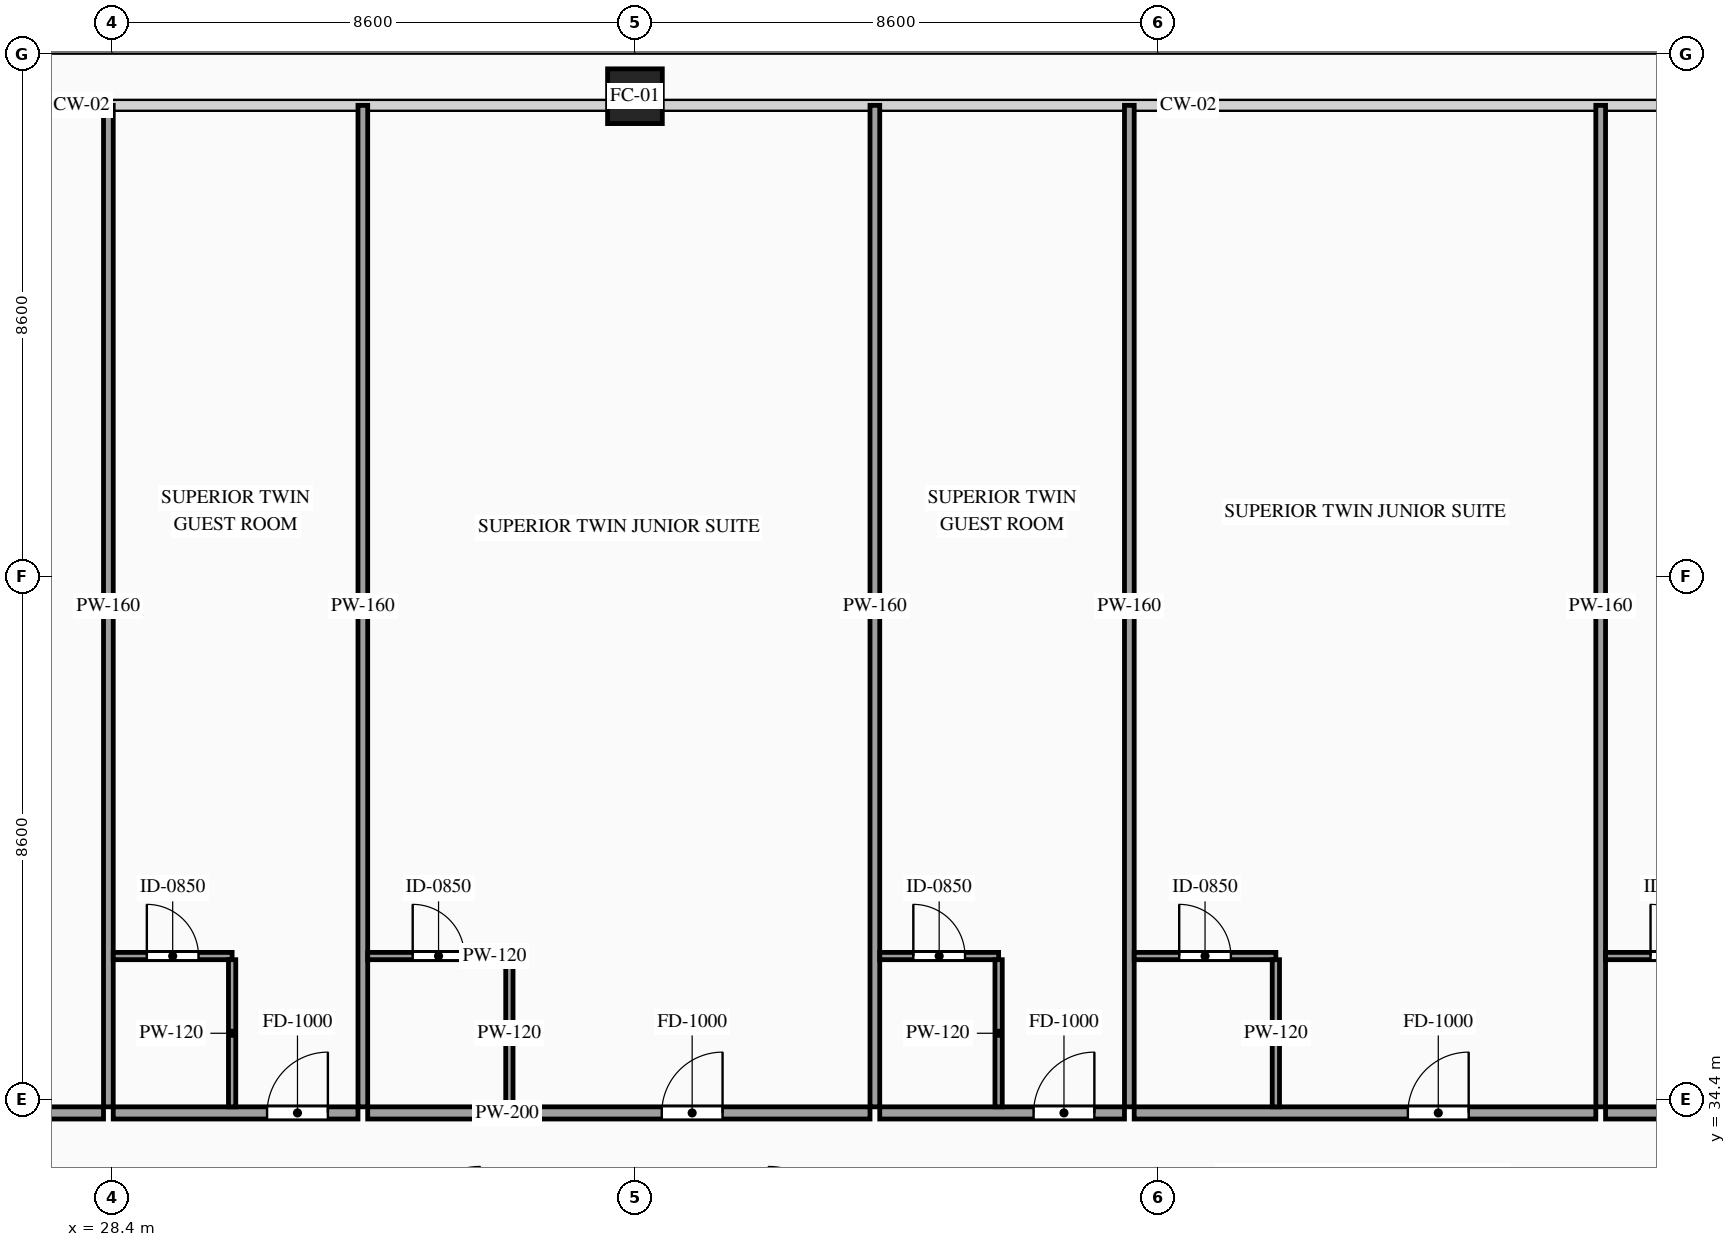
"""IFC4 building model, lengths in metres.
Left out: names, types, materials, properties, quantities, classifications, styles, units other than length and angle.
Written with IfcOpenShell. Run it as: python <this file> out.ifc"""

import sys

from ifc_helpers import new_model, si_unit, direction, frame, frame_2d, origin, origin_2d, place, context, subcontext, project, spatial, rectangle, hollow_rectangle, extrude, source, transform, mapped, element, fill, save


model = new_model("IFC4")
c1 = context("Model", 3, precision=1e-05, world=origin(), true_north=direction((0.0, 1.0)))
c2 = subcontext(c1, "Body", "Model", "MODEL_VIEW")
j1 = project(units=[si_unit("LENGTHUNIT", "METRE"), si_unit("PLANEANGLEUNIT", "RADIAN")], contexts=[c1])
p1 = place(None, origin())
s1 = spatial("IfcSite", under=j1, at=p1, CompositionType="ELEMENT")
p2 = place(p1, origin())
s2 = spatial("IfcBuilding", under=s1, at=p2, CompositionType="ELEMENT")
p3 = place(p2, frame((0.0, 0.0, 53.2)))
s3 = spatial("IfcBuildingStorey", under=s2, at=p3, CompositionType="ELEMENT", Elevation=53.2)
m1 = source(origin(), c2, "Body", "SweptSolid", [
    extrude(hollow_rectangle(XDim=0.9, YDim=0.9, WallThickness=0.042, at=origin_2d()), origin(), (0.0, 0.0, 1.0), 3.6),
])
p4 = place(p3, frame((37.0, 50.9, 0.0), z_axis=(0.0, 0.0, 1.0), x_axis=(1.0, 0.0, 0.0)))
e1 = element("IfcColumn", 1, at=p4, inside=s3, PredefinedType="COLUMN", context=c2, shape_type="MappedRepresentation", body=[
    mapped(m1, transform((0.0, 0.0, 0.0), scale=1.0)),
])
p5 = place(p3, frame((21.197, 34.18, 0.0), z_axis=(0.0, 0.0, 1.0), x_axis=(1.0, 0.0, 0.0)))
e2 = element("IfcWall", 2, at=p5, inside=s3, PredefinedType="PARTITIONING", context=c2, shape_type="SweptSolid", body=[
    extrude(rectangle(XDim=7.063, YDim=0.2, at=frame_2d((3.531, 0.0))), origin(), (0.0, 0.0, 1.0), 3.38),
])
p6 = place(p5, frame((4.237, 0.0, 0.0)))
e3 = element("IfcOpeningElement", 3, at=p6, cuts=e2, PredefinedType="OPENING", context=c2, shape_type="SweptSolid", body=[
    extrude(rectangle(XDim=1.0, YDim=2.2, at=frame_2d((0.5, 1.1))), frame((0.0, 0.115, 0.0), z_axis=(0.0, -1.0, 0.0), x_axis=(1.0, 0.0, 0.0)), (0.0, 0.0, 1.0), 0.23),
])
m2 = source(origin(), c2, "Body", "SweptSolid", [
    extrude(rectangle(XDim=16.47, YDim=0.16, at=frame_2d((8.235, 0.0))), origin(), (0.0, 0.0, 1.0), 3.38),
])
p7 = place(p3, frame((28.34, 34.28, 0.0), z_axis=(0.0, 0.0, 1.0), x_axis=(0.0, 1.0, 0.0)))
e4 = element("IfcWall", 4, at=p7, inside=s3, PredefinedType="PARTITIONING", context=c2, shape_type="MappedRepresentation", body=[
    mapped(m2, transform((0.0, 0.0, 0.0), scale=1.0)),
])
p8 = place(p3, frame((28.42, 34.18, 0.0), z_axis=(0.0, 0.0, 1.0), x_axis=(1.0, 0.0, 0.0)))
e5 = element("IfcWall", 5, at=p8, inside=s3, PredefinedType="PARTITIONING", context=c2, shape_type="SweptSolid", body=[
    extrude(rectangle(XDim=4.025, YDim=0.2, at=frame_2d((2.013, 0.0))), origin(), (0.0, 0.0, 1.0), 3.38),
])
p9 = place(p8, frame((2.53, 0.0, 0.0)))
e6 = element("IfcOpeningElement", 6, at=p9, cuts=e5, PredefinedType="OPENING", context=c2, shape_type="SweptSolid", body=[
    extrude(rectangle(XDim=1.0, YDim=2.2, at=frame_2d((0.5, 1.1))), frame((0.0, 0.115, 0.0), z_axis=(0.0, -1.0, 0.0), x_axis=(1.0, 0.0, 0.0)), (0.0, 0.0, 1.0), 0.23),
])
p10 = place(p3, frame((32.525, 34.28, 0.0), z_axis=(0.0, 0.0, 1.0), x_axis=(0.0, 1.0, 0.0)))
e7 = element("IfcWall", 7, at=p10, inside=s3, PredefinedType="PARTITIONING", context=c2, shape_type="MappedRepresentation", body=[
    mapped(m2, transform((0.0, 0.0, 0.0), scale=1.0)),
])
p11 = place(p3, frame((28.42, 36.76, 0.0), z_axis=(0.0, 0.0, 1.0), x_axis=(1.0, 0.0, 0.0)))
e8 = element("IfcWall", 8, at=p11, inside=s3, PredefinedType="PARTITIONING", context=c2, shape_type="SweptSolid", body=[
    extrude(rectangle(XDim=1.955, YDim=0.12, at=frame_2d((0.978, 0.0))), origin(), (0.0, 0.0, 1.0), 3.38),
])
p12 = place(p11, frame((0.552, 0.0, 0.0)))
e9 = element("IfcOpeningElement", 9, at=p12, cuts=e8, PredefinedType="OPENING", context=c2, shape_type="SweptSolid", body=[
    extrude(rectangle(XDim=0.85, YDim=2.1, at=frame_2d((0.425, 1.05))), frame((0.0, 0.075, 0.0), z_axis=(0.0, -1.0, 0.0), x_axis=(1.0, 0.0, 0.0)), (0.0, 0.0, 1.0), 0.15),
])
m3 = source(origin(), c2, "Body", "SweptSolid", [
    extrude(rectangle(XDim=2.42, YDim=0.12, at=frame_2d((1.21, 0.0))), origin(), (0.0, 0.0, 1.0), 3.38),
])
p13 = place(p3, frame((30.375, 34.28, 0.0), z_axis=(0.0, 0.0, 1.0), x_axis=(0.0, 1.0, 0.0)))
e10 = element("IfcWall", 10, at=p13, inside=s3, PredefinedType="PARTITIONING", context=c2, shape_type="MappedRepresentation", body=[
    mapped(m3, transform((0.0, 0.0, 0.0), scale=1.0)),
])
p14 = place(p3, frame((32.605, 34.18, 0.0), z_axis=(0.0, 0.0, 1.0), x_axis=(1.0, 0.0, 0.0)))
e11 = element("IfcWall", 11, at=p14, inside=s3, PredefinedType="PARTITIONING", context=c2, shape_type="SweptSolid", body=[
    extrude(rectangle(XDim=8.261, YDim=0.2, at=frame_2d((4.13, 0.0))), origin(), (0.0, 0.0, 1.0), 3.38),
])
p15 = place(p14, frame((4.836, 0.0, 0.0)))
e12 = element("IfcOpeningElement", 12, at=p15, cuts=e11, PredefinedType="OPENING", context=c2, shape_type="SweptSolid", body=[
    extrude(rectangle(XDim=1.0, YDim=2.2, at=frame_2d((0.5, 1.1))), frame((0.0, 0.115, 0.0), z_axis=(0.0, -1.0, 0.0), x_axis=(1.0, 0.0, 0.0)), (0.0, 0.0, 1.0), 0.23),
])
p16 = place(p3, frame((40.946, 34.28, 0.0), z_axis=(0.0, 0.0, 1.0), x_axis=(0.0, 1.0, 0.0)))
e13 = element("IfcWall", 13, at=p16, inside=s3, PredefinedType="PARTITIONING", context=c2, shape_type="MappedRepresentation", body=[
    mapped(m2, transform((0.0, 0.0, 0.0), scale=1.0)),
])
p17 = place(p3, frame((32.605, 36.76, 0.0), z_axis=(0.0, 0.0, 1.0), x_axis=(1.0, 0.0, 0.0)))
e14 = element("IfcWall", 14, at=p17, inside=s3, PredefinedType="PARTITIONING", context=c2, shape_type="SweptSolid", body=[
    extrude(rectangle(XDim=2.33, YDim=0.12, at=frame_2d((1.165, 0.0))), origin(), (0.0, 0.0, 1.0), 3.38),
])
p18 = place(p17, frame((0.74, 0.0, 0.0)))
e15 = element("IfcOpeningElement", 15, at=p18, cuts=e14, PredefinedType="OPENING", context=c2, shape_type="SweptSolid", body=[
    extrude(rectangle(XDim=0.85, YDim=2.1, at=frame_2d((0.425, 1.05))), frame((0.0, 0.075, 0.0), z_axis=(0.0, -1.0, 0.0), x_axis=(1.0, 0.0, 0.0)), (0.0, 0.0, 1.0), 0.15),
])
p19 = place(p3, frame((34.935, 34.28, 0.0), z_axis=(0.0, 0.0, 1.0), x_axis=(0.0, 1.0, 0.0)))
e16 = element("IfcWall", 16, at=p19, inside=s3, PredefinedType="PARTITIONING", context=c2, shape_type="MappedRepresentation", body=[
    mapped(m3, transform((0.0, 0.0, 0.0), scale=1.0)),
])
p20 = place(p3, frame((41.026, 34.18, 0.0), z_axis=(0.0, 0.0, 1.0), x_axis=(1.0, 0.0, 0.0)))
e17 = element("IfcWall", 17, at=p20, inside=s3, PredefinedType="PARTITIONING", context=c2, shape_type="SweptSolid", body=[
    extrude(rectangle(XDim=4.025, YDim=0.2, at=frame_2d((2.013, 0.0))), origin(), (0.0, 0.0, 1.0), 3.38),
])
p21 = place(p20, frame((2.53, 0.0, 0.0)))
e18 = element("IfcOpeningElement", 18, at=p21, cuts=e17, PredefinedType="OPENING", context=c2, shape_type="SweptSolid", body=[
    extrude(rectangle(XDim=1.0, YDim=2.2, at=frame_2d((0.5, 1.1))), frame((0.0, 0.115, 0.0), z_axis=(0.0, -1.0, 0.0), x_axis=(1.0, 0.0, 0.0)), (0.0, 0.0, 1.0), 0.23),
])
p22 = place(p3, frame((45.131, 34.28, 0.0), z_axis=(0.0, 0.0, 1.0), x_axis=(0.0, 1.0, 0.0)))
e19 = element("IfcWall", 19, at=p22, inside=s3, PredefinedType="PARTITIONING", context=c2, shape_type="MappedRepresentation", body=[
    mapped(m2, transform((0.0, 0.0, 0.0), scale=1.0)),
])
p23 = place(p3, frame((41.026, 36.76, 0.0), z_axis=(0.0, 0.0, 1.0), x_axis=(1.0, 0.0, 0.0)))
e20 = element("IfcWall", 20, at=p23, inside=s3, PredefinedType="PARTITIONING", context=c2, shape_type="SweptSolid", body=[
    extrude(rectangle(XDim=1.955, YDim=0.12, at=frame_2d((0.978, 0.0))), origin(), (0.0, 0.0, 1.0), 3.38),
])
p24 = place(p23, frame((0.552, 0.0, 0.0)))
e21 = element("IfcOpeningElement", 21, at=p24, cuts=e20, PredefinedType="OPENING", context=c2, shape_type="SweptSolid", body=[
    extrude(rectangle(XDim=0.85, YDim=2.1, at=frame_2d((0.425, 1.05))), frame((0.0, 0.075, 0.0), z_axis=(0.0, -1.0, 0.0), x_axis=(1.0, 0.0, 0.0)), (0.0, 0.0, 1.0), 0.15),
])
p25 = place(p3, frame((42.981, 34.28, 0.0), z_axis=(0.0, 0.0, 1.0), x_axis=(0.0, 1.0, 0.0)))
e22 = element("IfcWall", 22, at=p25, inside=s3, PredefinedType="PARTITIONING", context=c2, shape_type="MappedRepresentation", body=[
    mapped(m3, transform((0.0, 0.0, 0.0), scale=1.0)),
])
p26 = place(p3, frame((45.211, 34.18, 0.0), z_axis=(0.0, 0.0, 1.0), x_axis=(1.0, 0.0, 0.0)))
e23 = element("IfcWall", 23, at=p26, inside=s3, PredefinedType="PARTITIONING", context=c2, shape_type="SweptSolid", body=[
    extrude(rectangle(XDim=7.592, YDim=0.2, at=frame_2d((3.796, 0.0))), origin(), (0.0, 0.0, 1.0), 3.38),
])
p27 = place(p26, frame((4.501, 0.0, 0.0)))
e24 = element("IfcOpeningElement", 24, at=p27, cuts=e23, PredefinedType="OPENING", context=c2, shape_type="SweptSolid", body=[
    extrude(rectangle(XDim=1.0, YDim=2.2, at=frame_2d((0.5, 1.1))), frame((0.0, 0.115, 0.0), z_axis=(0.0, -1.0, 0.0), x_axis=(1.0, 0.0, 0.0)), (0.0, 0.0, 1.0), 0.23),
])
p28 = place(p3, frame((52.883, 34.28, 0.0), z_axis=(0.0, 0.0, 1.0), x_axis=(0.0, 1.0, 0.0)))
e25 = element("IfcWall", 25, at=p28, inside=s3, PredefinedType="PARTITIONING", context=c2, shape_type="MappedRepresentation", body=[
    mapped(m2, transform((0.0, 0.0, 0.0), scale=1.0)),
])
p29 = place(p3, frame((45.211, 36.76, 0.0), z_axis=(0.0, 0.0, 1.0), x_axis=(1.0, 0.0, 0.0)))
e26 = element("IfcWall", 26, at=p29, inside=s3, PredefinedType="PARTITIONING", context=c2, shape_type="SweptSolid", body=[
    extrude(rectangle(XDim=2.33, YDim=0.12, at=frame_2d((1.165, 0.0))), origin(), (0.0, 0.0, 1.0), 3.38),
])
p30 = place(p29, frame((0.74, 0.0, 0.0)))
e27 = element("IfcOpeningElement", 27, at=p30, cuts=e26, PredefinedType="OPENING", context=c2, shape_type="SweptSolid", body=[
    extrude(rectangle(XDim=0.85, YDim=2.1, at=frame_2d((0.425, 1.05))), frame((0.0, 0.075, 0.0), z_axis=(0.0, -1.0, 0.0), x_axis=(1.0, 0.0, 0.0)), (0.0, 0.0, 1.0), 0.15),
])
p31 = place(p3, frame((47.541, 34.28, 0.0), z_axis=(0.0, 0.0, 1.0), x_axis=(0.0, 1.0, 0.0)))
e28 = element("IfcWall", 28, at=p31, inside=s3, PredefinedType="PARTITIONING", context=c2, shape_type="MappedRepresentation", body=[
    mapped(m3, transform((0.0, 0.0, 0.0), scale=1.0)),
])
p32 = place(p3, frame((52.963, 34.18, 0.0), z_axis=(0.0, 0.0, 1.0), x_axis=(1.0, 0.0, 0.0)))
e29 = element("IfcWall", 29, at=p32, inside=s3, PredefinedType="PARTITIONING", context=c2, shape_type="SweptSolid", body=[
    extrude(rectangle(XDim=6.097, YDim=0.2, at=frame_2d((3.049, 0.0))), origin(), (0.0, 0.0, 1.0), 3.38),
])
p33 = place(p32, frame((3.753, 0.0, 0.0)))
e30 = element("IfcOpeningElement", 30, at=p33, cuts=e29, PredefinedType="OPENING", context=c2, shape_type="SweptSolid", body=[
    extrude(rectangle(XDim=1.0, YDim=2.2, at=frame_2d((0.5, 1.1))), frame((0.0, 0.115, 0.0), z_axis=(0.0, -1.0, 0.0), x_axis=(1.0, 0.0, 0.0)), (0.0, 0.0, 1.0), 0.23),
])
p34 = place(p3, frame((52.963, 36.76, 0.0), z_axis=(0.0, 0.0, 1.0), x_axis=(1.0, 0.0, 0.0)))
e31 = element("IfcWall", 31, at=p34, inside=s3, PredefinedType="PARTITIONING", context=c2, shape_type="SweptSolid", body=[
    extrude(rectangle(XDim=2.33, YDim=0.12, at=frame_2d((1.165, 0.0))), origin(), (0.0, 0.0, 1.0), 3.38),
])
p35 = place(p34, frame((0.74, 0.0, 0.0)))
e32 = element("IfcOpeningElement", 32, at=p35, cuts=e31, PredefinedType="OPENING", context=c2, shape_type="SweptSolid", body=[
    extrude(rectangle(XDim=0.85, YDim=2.1, at=frame_2d((0.425, 1.05))), frame((0.0, 0.075, 0.0), z_axis=(0.0, -1.0, 0.0), x_axis=(1.0, 0.0, 0.0)), (0.0, 0.0, 1.0), 0.15),
])
m4 = source(origin(), c2, "Body", "SweptSolid", [
    extrude(rectangle(XDim=1.0, YDim=2.2, at=frame_2d((0.5, 1.1))), frame((0.0, 0.025, 0.0), z_axis=(0.0, -1.0, 0.0), x_axis=(1.0, 0.0, 0.0)), (0.0, 0.0, 1.0), 0.05),
])
p36 = place(p9, origin())
e33 = element("IfcDoor", 33, at=p36, inside=s3, OperationType="SINGLE_SWING_RIGHT", PredefinedType="DOOR", context=c2, shape_type="MappedRepresentation", body=[
    mapped(m4, transform((0.0, 0.0, 0.0), scale=1.0)),
])
fill(e6, e33)
m5 = source(origin(), c2, "Body", "SweptSolid", [
    extrude(rectangle(XDim=0.85, YDim=2.1, at=frame_2d((0.425, 1.05))), frame((0.0, 0.025, 0.0), z_axis=(0.0, -1.0, 0.0), x_axis=(1.0, 0.0, 0.0)), (0.0, 0.0, 1.0), 0.05),
])
p37 = place(p12, origin())
e34 = element("IfcDoor", 34, at=p37, inside=s3, OperationType="SINGLE_SWING_LEFT", PredefinedType="DOOR", context=c2, shape_type="MappedRepresentation", body=[
    mapped(m5, transform((0.0, 0.0, 0.0), scale=1.0)),
])
fill(e9, e34)
p38 = place(p15, origin())
e35 = element("IfcDoor", 35, at=p38, inside=s3, OperationType="SINGLE_SWING_RIGHT", PredefinedType="DOOR", context=c2, shape_type="MappedRepresentation", body=[
    mapped(m4, transform((0.0, 0.0, 0.0), scale=1.0)),
])
fill(e12, e35)
p39 = place(p18, origin())
e36 = element("IfcDoor", 36, at=p39, inside=s3, OperationType="SINGLE_SWING_LEFT", PredefinedType="DOOR", context=c2, shape_type="MappedRepresentation", body=[
    mapped(m5, transform((0.0, 0.0, 0.0), scale=1.0)),
])
fill(e15, e36)
p40 = place(p21, origin())
e37 = element("IfcDoor", 37, at=p40, inside=s3, OperationType="SINGLE_SWING_RIGHT", PredefinedType="DOOR", context=c2, shape_type="MappedRepresentation", body=[
    mapped(m4, transform((0.0, 0.0, 0.0), scale=1.0)),
])
fill(e18, e37)
p41 = place(p24, origin())
e38 = element("IfcDoor", 38, at=p41, inside=s3, OperationType="SINGLE_SWING_LEFT", PredefinedType="DOOR", context=c2, shape_type="MappedRepresentation", body=[
    mapped(m5, transform((0.0, 0.0, 0.0), scale=1.0)),
])
fill(e21, e38)
p42 = place(p27, origin())
e39 = element("IfcDoor", 39, at=p42, inside=s3, OperationType="SINGLE_SWING_RIGHT", PredefinedType="DOOR", context=c2, shape_type="MappedRepresentation", body=[
    mapped(m4, transform((0.0, 0.0, 0.0), scale=1.0)),
])
fill(e24, e39)
p43 = place(p30, origin())
e40 = element("IfcDoor", 40, at=p43, inside=s3, OperationType="SINGLE_SWING_LEFT", PredefinedType="DOOR", context=c2, shape_type="MappedRepresentation", body=[
    mapped(m5, transform((0.0, 0.0, 0.0), scale=1.0)),
])
fill(e27, e40)
p44 = place(p35, origin())
e41 = element("IfcDoor", 41, at=p44, inside=s3, OperationType="SINGLE_SWING_LEFT", PredefinedType="DOOR", context=c2, shape_type="MappedRepresentation", body=[
    mapped(m5, transform((0.0, 0.0, 0.0), scale=1.0)),
])
fill(e32, e41)
save(model, sys.argv[1])
